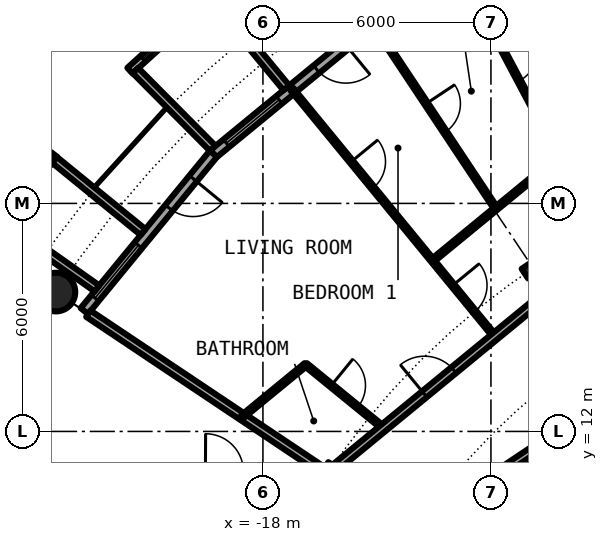
"""IFC4 building model, lengths in metres.
Left out: names, types, materials, properties, quantities, classifications, styles, units other than length and angle.
Written with IfcOpenShell. Run it as: python <this file> out.ifc"""

import sys

from ifc_helpers import new_model, si_unit, direction, frame, frame_2d, origin, origin_2d, place, context, subcontext, project, spatial, rectangle, circle, hollow_circle, i_section, extrude, element, fill, save


model = new_model("IFC4")
c1 = context("Model", 3, precision=1e-05, world=origin(), true_north=direction((0.0, 1.0)))
c2 = subcontext(c1, "Body", "Model", "MODEL_VIEW")
j1 = project(units=[si_unit("LENGTHUNIT", "METRE"), si_unit("PLANEANGLEUNIT", "RADIAN")], contexts=[c1])
p1 = place(None, origin())
s1 = spatial("IfcSite", under=j1, at=p1, CompositionType="ELEMENT")
p2 = place(p1, origin())
s2 = spatial("IfcBuilding", under=s1, at=p2, CompositionType="ELEMENT")
p3 = place(p2, frame((0.0, 0.0, 88.0)))
s3 = spatial("IfcBuildingStorey", under=s2, at=p3, CompositionType="ELEMENT", Elevation=88.0)
p4 = place(p3, frame((-23.448, 15.667, 0.0), z_axis=(0.0, 0.0, 1.0), x_axis=(1.0, 0.0, 0.0)))
e1 = element("IfcColumn", 1, at=p4, inside=s3, PredefinedType="COLUMN", context=c2, shape_type="SweptSolid", body=[
    extrude(hollow_circle(Radius=0.508, WallThickness=0.04, at=origin_2d()), origin(), (0.0, 0.0, 1.0), 3.05),
])
for number, where, z_axis, x_axis in (
    (2, (-10.889, 16.297, 0.0), (0.0, 0.0, 1.0), (-0.556, 0.831, 0.0)),
    (3, (-16.297, 10.889, 0.0), (0.0, 0.0, 1.0), (-0.831, 0.556, 0.0)),
):
    element("IfcColumn", number, at=place(p3, frame(where, z_axis=z_axis, x_axis=x_axis)), inside=s3, PredefinedType="COLUMN", context=c2, shape_type="SweptSolid", body=[
        extrude(i_section(OverallWidth=0.306, OverallDepth=0.524, WebThickness=0.021, FlangeThickness=0.04, FilletRadius=0.027, at=origin_2d()), origin(), (0.0, 0.0, 1.0), 3.05),
    ])
p5 = place(p3, frame((-15.167, 22.699, 0.0), z_axis=(0.0, 0.0, 1.0), x_axis=(-0.773019449054, -0.634382322723, 0.0)))
e4 = element("IfcWall", 4, at=p5, inside=s3, PredefinedType="SOLIDWALL", context=c2, shape_type="SweptSolid", body=[
    extrude(rectangle(XDim=5.352, YDim=0.25, at=frame_2d((2.676, 0.0))), origin(), (0.0, 0.0, 1.0), 2.7),
])
p6 = place(p5, frame((0.841, 0.0, 0.0)))
e5 = element("IfcOpeningElement", 5, at=p6, cuts=e4, PredefinedType="OPENING", context=c2, shape_type="SweptSolid", body=[
    extrude(rectangle(XDim=1.0, YDim=2.2, at=frame_2d((0.5, 1.1))), frame((0.0, 0.135, 0.0), z_axis=(0.0, -1.0, 0.0), x_axis=(1.0, 0.0, 0.0)), (0.0, 0.0, 1.0), 0.27),
])
p7 = place(p5, frame((3.111, 0.0, 0.3)))
e6 = element("IfcOpeningElement", 6, at=p7, cuts=e4, PredefinedType="OPENING", context=c2, shape_type="SweptSolid", body=[
    extrude(rectangle(XDim=1.8, YDim=2.1, at=frame_2d((0.9, 1.05))), frame((0.0, 0.135, 0.0), z_axis=(0.0, -1.0, 0.0), x_axis=(1.0, 0.0, 0.0)), (0.0, 0.0, 1.0), 0.27),
])
p8 = place(p3, frame((-19.282, 23.503, -0.03), z_axis=(0.0, 0.0, 1.0), x_axis=(-0.740998365753, -0.671506829416, 0.0)))
e7 = element("IfcWall", 7, at=p8, inside=s3, PredefinedType="SOLIDWALL", context=c2, shape_type="SweptSolid", body=[
    extrude(rectangle(XDim=2.993, YDim=0.2, at=frame_2d((1.497, 0.0))), origin(), (0.0, 0.0, 1.0), 2.73),
])
p9 = place(p8, frame((0.457, 0.0, 0.33)))
e8 = element("IfcOpeningElement", 8, at=p9, cuts=e7, PredefinedType="OPENING", context=c2, shape_type="SweptSolid", body=[
    extrude(circle(Radius=1.04, at=frame_2d((1.04, 1.04))), frame((0.0, 0.11, 0.0), z_axis=(0.0, -1.0, 0.0), x_axis=(1.0, 0.0, 0.0)), (0.0, 0.0, 1.0), 0.22),
])
p10 = place(p3, frame((-17.384, 21.041, -0.03), z_axis=(0.0, 0.0, 1.0), x_axis=(-0.63709551667, 0.770784861449, 0.0)))
e9 = element("IfcWall", 9, at=p10, inside=s3, PredefinedType="SOLIDWALL", context=c2, shape_type="SweptSolid", body=[
    extrude(rectangle(XDim=3.006, YDim=0.2, at=frame_2d((1.503, 0.0))), origin(), (0.0, 0.0, 1.0), 2.73),
])
p11 = place(p3, frame((-19.323, 19.45, -0.03), z_axis=(0.0, 0.0, 1.0), x_axis=(-0.704476739375, 0.709727076896, 0.0)))
e10 = element("IfcWall", 10, at=p11, inside=s3, PredefinedType="SOLIDWALL", context=c2, shape_type="SweptSolid", body=[
    extrude(rectangle(XDim=2.883, YDim=0.2, at=frame_2d((1.441, 0.0))), origin(), (0.0, 0.0, 1.0), 2.73),
])
p12 = place(p3, frame((-19.304, 19.304, 0.0), z_axis=(0.0, 0.0, 1.0), x_axis=(-0.634382322723, -0.773019449054, 0.0)))
e11 = element("IfcWall", 11, at=p12, inside=s3, PredefinedType="SOLIDWALL", context=c2, shape_type="SweptSolid", body=[
    extrude(rectangle(XDim=5.352, YDim=0.25, at=frame_2d((2.676, 0.0))), origin(), (0.0, 0.0, 1.0), 2.7),
])
p13 = place(p12, frame((0.841, 0.0, 0.0)))
e12 = element("IfcOpeningElement", 12, at=p13, cuts=e11, PredefinedType="OPENING", context=c2, shape_type="SweptSolid", body=[
    extrude(rectangle(XDim=1.0, YDim=2.2, at=frame_2d((0.5, 1.1))), frame((0.0, 0.135, 0.0), z_axis=(0.0, -1.0, 0.0), x_axis=(1.0, 0.0, 0.0)), (0.0, 0.0, 1.0), 0.27),
])
p14 = place(p12, frame((3.111, 0.0, 0.3)))
e13 = element("IfcOpeningElement", 13, at=p14, cuts=e11, PredefinedType="OPENING", context=c2, shape_type="SweptSolid", body=[
    extrude(rectangle(XDim=1.8, YDim=2.1, at=frame_2d((0.9, 1.05))), frame((0.0, 0.135, 0.0), z_axis=(0.0, -1.0, 0.0), x_axis=(1.0, 0.0, 0.0)), (0.0, 0.0, 1.0), 0.27),
])
p15 = place(p3, frame((-23.497, 19.289, -0.03), z_axis=(0.0, 0.0, 1.0), x_axis=(-0.60418752353, -0.796842165306, 0.0)))
e14 = element("IfcWall", 14, at=p15, inside=s3, PredefinedType="SOLIDWALL", context=c2, shape_type="SweptSolid", body=[
    extrude(rectangle(XDim=2.337, YDim=0.2, at=frame_2d((1.168, 0.0))), origin(), (0.0, 0.0, 1.0), 2.73),
])
p16 = place(p15, frame((0.128, 0.0, 0.33)))
e15 = element("IfcOpeningElement", 15, at=p16, cuts=e14, PredefinedType="OPENING", context=c2, shape_type="SweptSolid", body=[
    extrude(circle(Radius=1.04, at=frame_2d((1.04, 1.04))), frame((0.0, 0.11, 0.0), z_axis=(0.0, -1.0, 0.0), x_axis=(1.0, 0.0, 0.0)), (0.0, 0.0, 1.0), 0.22),
])
p17 = place(p3, frame((-21.155, 17.246, -0.03), z_axis=(0.0, 0.0, 1.0), x_axis=(-0.775179004516, 0.631741648902, 0.0)))
e16 = element("IfcWall", 16, at=p17, inside=s3, PredefinedType="SOLIDWALL", context=c2, shape_type="SweptSolid", body=[
    extrude(rectangle(XDim=3.006, YDim=0.2, at=frame_2d((1.503, 0.0))), origin(), (0.0, 0.0, 1.0), 2.73),
])
p18 = place(p3, frame((-22.37, 15.765, -0.03), z_axis=(0.0, 0.0, 1.0), x_axis=(-0.817256123454, 0.576274612209, 0.0)))
e17 = element("IfcWall", 17, at=p18, inside=s3, PredefinedType="SOLIDWALL", context=c2, shape_type="SweptSolid", body=[
    extrude(rectangle(XDim=2.933, YDim=0.2, at=frame_2d((1.466, 0.0))), origin(), (0.0, 0.0, 1.0), 2.73),
])
p19 = place(p3, frame((-22.595, 15.098, 0.0), z_axis=(0.0, 0.0, 1.0), x_axis=(0.831382022135, -0.555701298605, 0.0)))
e18 = element("IfcWall", 18, at=p19, inside=s3, PredefinedType="PARTITIONING", context=c2, shape_type="SweptSolid", body=[
    extrude(rectangle(XDim=7.313, YDim=0.2, at=frame_2d((3.657, 0.0))), origin(), (0.0, 0.0, 1.0), 2.7),
])
p20 = place(p3, frame((-17.24, 21.007, 0.0), z_axis=(0.0, 0.0, 1.0), x_axis=(0.634396151441, -0.77300810024, 0.0)))
e19 = element("IfcWall", 19, at=p20, inside=s3, PredefinedType="PARTITIONING", context=c2, shape_type="SweptSolid", body=[
    extrude(rectangle(XDim=8.419, YDim=0.1, at=frame_2d((4.209, 0.0))), origin(), (0.0, 0.0, 1.0), 2.7),
])
p21 = place(p20, frame((6.679, 0.0, 0.0)))
e20 = element("IfcOpeningElement", 20, at=p21, cuts=e19, PredefinedType="OPENING", context=c2, shape_type="SweptSolid", body=[
    extrude(rectangle(XDim=0.9, YDim=2.3, at=frame_2d((0.45, 1.15))), frame((0.0, 0.06, 0.0), z_axis=(0.0, -1.0, 0.0), x_axis=(1.0, 0.0, 0.0)), (0.0, 0.0, 1.0), 0.12),
])
p22 = place(p20, frame((2.468, 0.0, 0.0)))
e21 = element("IfcOpeningElement", 21, at=p22, cuts=e19, PredefinedType="OPENING", context=c2, shape_type="SweptSolid", body=[
    extrude(rectangle(XDim=0.9, YDim=2.3, at=frame_2d((0.45, 1.15))), frame((0.0, 0.06, 0.0), z_axis=(0.0, -1.0, 0.0), x_axis=(1.0, 0.0, 0.0)), (0.0, 0.0, 1.0), 0.12),
])
p23 = place(p3, frame((-16.874, 13.758, 0.0), z_axis=(0.0, 0.0, 1.0), x_axis=(0.774979608522, -0.631986239072, 0.0)))
e22 = element("IfcWall", 22, at=p23, inside=s3, PredefinedType="PARTITIONING", context=c2, shape_type="SweptSolid", body=[
    extrude(rectangle(XDim=2.636, YDim=0.1, at=frame_2d((1.318, 0.0))), origin(), (0.0, 0.0, 1.0), 2.7),
])
p24 = place(p23, frame((0.868, 0.0, 0.0)))
e23 = element("IfcOpeningElement", 23, at=p24, cuts=e22, PredefinedType="OPENING", context=c2, shape_type="SweptSolid", body=[
    extrude(rectangle(XDim=0.9, YDim=2.3, at=frame_2d((0.45, 1.15))), frame((0.0, 0.06, 0.0), z_axis=(0.0, -1.0, 0.0), x_axis=(1.0, 0.0, 0.0)), (0.0, 0.0, 1.0), 0.12),
])
p25 = place(p3, frame((-15.039, 22.634, 0.0), z_axis=(0.0, 0.0, 1.0), x_axis=(0.553440102418, -0.832888980018, 0.0)))
e24 = element("IfcWall", 24, at=p25, inside=s3, PredefinedType="PARTITIONING", context=c2, shape_type="SweptSolid", body=[
    extrude(rectangle(XDim=5.726, YDim=0.1, at=frame_2d((2.863, 0.0))), origin(), (0.0, 0.0, 1.0), 2.7),
])
p26 = place(p25, frame((2.413, 0.0, 0.0)))
e25 = element("IfcOpeningElement", 25, at=p26, cuts=e24, PredefinedType="OPENING", context=c2, shape_type="SweptSolid", body=[
    extrude(rectangle(XDim=0.9, YDim=2.3, at=frame_2d((0.45, 1.15))), frame((0.0, 0.06, 0.0), z_axis=(0.0, -1.0, 0.0), x_axis=(1.0, 0.0, 0.0)), (0.0, 0.0, 1.0), 0.12),
])
p27 = place(p3, frame((-12.734, 24.007, 0.0), z_axis=(0.0, 0.0, 1.0), x_axis=(0.468610030042, -0.883405139075, 0.0)))
e26 = element("IfcWall", 26, at=p27, inside=s3, PredefinedType="PARTITIONING", context=c2, shape_type="SweptSolid", body=[
    extrude(rectangle(XDim=5.403, YDim=0.1, at=frame_2d((2.702, 0.0))), origin(), (0.0, 0.0, 1.0), 2.7),
])
p28 = place(p27, frame((2.252, 0.0, 0.0)))
e27 = element("IfcOpeningElement", 27, at=p28, cuts=e26, PredefinedType="OPENING", context=c2, shape_type="SweptSolid", body=[
    extrude(rectangle(XDim=0.9, YDim=2.3, at=frame_2d((0.45, 1.15))), frame((0.0, 0.06, 0.0), z_axis=(0.0, -1.0, 0.0), x_axis=(1.0, 0.0, 0.0)), (0.0, 0.0, 1.0), 0.12),
])
p29 = place(p3, frame((-12.708, 10.286, 0.0), z_axis=(0.0, 0.0, 1.0), x_axis=(0.831405725802, 0.555665834026, 0.0)))
e28 = element("IfcWall", 28, at=p29, inside=s3, PredefinedType="PARTITIONING", context=c2, shape_type="SweptSolid", body=[
    extrude(rectangle(XDim=11.314, YDim=0.2, at=frame_2d((5.657, 0.0))), origin(), (0.0, 0.0, 1.0), 2.7),
])
p30 = place(p29, frame((5.969, 0.0, 0.0)))
e29 = element("IfcOpeningElement", 29, at=p30, cuts=e28, PredefinedType="OPENING", context=c2, shape_type="SweptSolid", body=[
    extrude(rectangle(XDim=1.0, YDim=2.3, at=frame_2d((0.5, 1.15))), frame((0.0, 0.11, 0.0), z_axis=(0.0, -1.0, 0.0), x_axis=(1.0, 0.0, 0.0)), (0.0, 0.0, 1.0), 0.22),
])
p31 = place(p3, frame((-16.173, 10.991, 0.0), z_axis=(0.0, 0.0, 1.0), x_axis=(0.773049018445, 0.634346289562, 0.0)))
e30 = element("IfcWall", 30, at=p31, inside=s3, PredefinedType="PARTITIONING", context=c2, shape_type="SweptSolid", body=[
    extrude(rectangle(XDim=11.219, YDim=0.2, at=frame_2d((5.61, 0.0))), origin(), (0.0, 0.0, 1.0), 2.38),
])
p32 = place(p31, frame((3.135, 0.0, 0.0)))
e31 = element("IfcOpeningElement", 31, at=p32, cuts=e30, PredefinedType="OPENING", context=c2, shape_type="SweptSolid", body=[
    extrude(rectangle(XDim=1.0, YDim=2.3, at=frame_2d((0.5, 1.15))), frame((0.0, 0.11, 0.0), z_axis=(0.0, -1.0, 0.0), x_axis=(1.0, 0.0, 0.0)), (0.0, 0.0, 1.0), 0.22),
])
p33 = place(p3, frame((-18.542, 12.389, 0.0), z_axis=(0.0, 0.0, 1.0), x_axis=(0.772948171844, 0.634469166818, 0.0)))
e32 = element("IfcWall", 32, at=p33, inside=s3, PredefinedType="PARTITIONING", context=c2, shape_type="SweptSolid", body=[
    extrude(rectangle(XDim=2.158, YDim=0.1, at=frame_2d((1.079, 0.0))), origin(), (0.0, 0.0, 1.0), 2.7),
])
p34 = place(p3, frame((-13.538, 16.496, 0.0), z_axis=(0.0, 0.0, 1.0), x_axis=(0.773000340237, 0.634405606843, 0.0)))
e33 = element("IfcWall", 33, at=p34, inside=s3, PredefinedType="PARTITIONING", context=c2, shape_type="SweptSolid", body=[
    extrude(rectangle(XDim=6.474, YDim=0.1, at=frame_2d((3.237, 0.0))), origin(), (0.0, 0.0, 1.0), 2.7),
])
p35 = place(p6, origin())
e34 = element("IfcDoor", 34, at=p35, inside=s3, OperationType="SINGLE_SWING_LEFT", PredefinedType="DOOR", context=c2, shape_type="SweptSolid", body=[
    extrude(rectangle(XDim=1.0, YDim=2.2, at=frame_2d((0.5, 1.1))), frame((0.0, 0.025, 0.0), z_axis=(0.0, -1.0, 0.0), x_axis=(1.0, 0.0, 0.0)), (0.0, 0.0, 1.0), 0.05),
])
fill(e5, e34)
p36 = place(p7, origin())
e35 = element("IfcWindow", 35, at=p36, inside=s3, PartitioningType="SINGLE_PANEL", PredefinedType="WINDOW", context=c2, shape_type="SweptSolid", body=[
    extrude(rectangle(XDim=1.8, YDim=2.1, at=frame_2d((0.9, 1.05))), frame((0.0, 0.03, 0.0), z_axis=(0.0, -1.0, 0.0), x_axis=(1.0, 0.0, 0.0)), (0.0, 0.0, 1.0), 0.06),
])
fill(e6, e35)
p37 = place(p9, origin())
e36 = element("IfcWindow", 36, at=p37, inside=s3, PartitioningType="SINGLE_PANEL", PredefinedType="WINDOW", context=c2, shape_type="SweptSolid", body=[
    extrude(circle(Radius=1.04, at=frame_2d((1.04, 1.04))), frame((0.0, 0.03, 0.0), z_axis=(0.0, -1.0, 0.0), x_axis=(1.0, 0.0, 0.0)), (0.0, 0.0, 1.0), 0.06),
])
fill(e8, e36)
p38 = place(p13, origin())
e37 = element("IfcDoor", 37, at=p38, inside=s3, OperationType="SINGLE_SWING_LEFT", PredefinedType="DOOR", context=c2, shape_type="SweptSolid", body=[
    extrude(rectangle(XDim=1.0, YDim=2.2, at=frame_2d((0.5, 1.1))), frame((0.0, 0.025, 0.0), z_axis=(0.0, -1.0, 0.0), x_axis=(1.0, 0.0, 0.0)), (0.0, 0.0, 1.0), 0.05),
])
fill(e12, e37)
p39 = place(p14, origin())
e38 = element("IfcWindow", 38, at=p39, inside=s3, PartitioningType="SINGLE_PANEL", PredefinedType="WINDOW", context=c2, shape_type="SweptSolid", body=[
    extrude(rectangle(XDim=1.8, YDim=2.1, at=frame_2d((0.9, 1.05))), frame((0.0, 0.03, 0.0), z_axis=(0.0, -1.0, 0.0), x_axis=(1.0, 0.0, 0.0)), (0.0, 0.0, 1.0), 0.06),
])
fill(e13, e38)
p40 = place(p32, origin())
e39 = element("IfcDoor", 39, at=p40, inside=s3, OperationType="SINGLE_SWING_LEFT", PredefinedType="DOOR", context=c2, shape_type="SweptSolid", body=[
    extrude(rectangle(XDim=1.0, YDim=2.3, at=frame_2d((0.5, 1.15))), frame((0.0, 0.025, 0.0), z_axis=(0.0, -1.0, 0.0), x_axis=(1.0, 0.0, 0.0)), (0.0, 0.0, 1.0), 0.05),
])
fill(e31, e39)
p41 = place(p24, origin())
e40 = element("IfcDoor", 40, at=p41, inside=s3, OperationType="SINGLE_SWING_LEFT", PredefinedType="DOOR", context=c2, shape_type="SweptSolid", body=[
    extrude(rectangle(XDim=0.9, YDim=2.3, at=frame_2d((0.45, 1.15))), frame((0.0, 0.025, 0.0), z_axis=(0.0, -1.0, 0.0), x_axis=(1.0, 0.0, 0.0)), (0.0, 0.0, 1.0), 0.05),
])
fill(e23, e40)
p42 = place(p21, origin())
e41 = element("IfcDoor", 41, at=p42, inside=s3, OperationType="SINGLE_SWING_RIGHT", PredefinedType="DOOR", context=c2, shape_type="SweptSolid", body=[
    extrude(rectangle(XDim=0.9, YDim=2.3, at=frame_2d((0.45, 1.15))), frame((0.0, 0.025, 0.0), z_axis=(0.0, -1.0, 0.0), x_axis=(1.0, 0.0, 0.0)), (0.0, 0.0, 1.0), 0.05),
])
fill(e20, e41)
p43 = place(p22, origin())
e42 = element("IfcDoor", 42, at=p43, inside=s3, OperationType="SINGLE_SWING_LEFT", PredefinedType="DOOR", context=c2, shape_type="SweptSolid", body=[
    extrude(rectangle(XDim=0.9, YDim=2.3, at=frame_2d((0.45, 1.15))), frame((0.0, 0.025, 0.0), z_axis=(0.0, -1.0, 0.0), x_axis=(1.0, 0.0, 0.0)), (0.0, 0.0, 1.0), 0.05),
])
fill(e21, e42)
p44 = place(p26, origin())
e43 = element("IfcDoor", 43, at=p44, inside=s3, OperationType="SINGLE_SWING_RIGHT", PredefinedType="DOOR", context=c2, shape_type="SweptSolid", body=[
    extrude(rectangle(XDim=0.9, YDim=2.3, at=frame_2d((0.45, 1.15))), frame((0.0, 0.025, 0.0), z_axis=(0.0, -1.0, 0.0), x_axis=(1.0, 0.0, 0.0)), (0.0, 0.0, 1.0), 0.05),
])
fill(e25, e43)
p45 = place(p28, origin())
e44 = element("IfcDoor", 44, at=p45, inside=s3, OperationType="SINGLE_SWING_LEFT", PredefinedType="DOOR", context=c2, shape_type="SweptSolid", body=[
    extrude(rectangle(XDim=0.9, YDim=2.3, at=frame_2d((0.45, 1.15))), frame((0.0, 0.025, 0.0), z_axis=(0.0, -1.0, 0.0), x_axis=(1.0, 0.0, 0.0)), (0.0, 0.0, 1.0), 0.05),
])
fill(e27, e44)
save(model, sys.argv[1])
